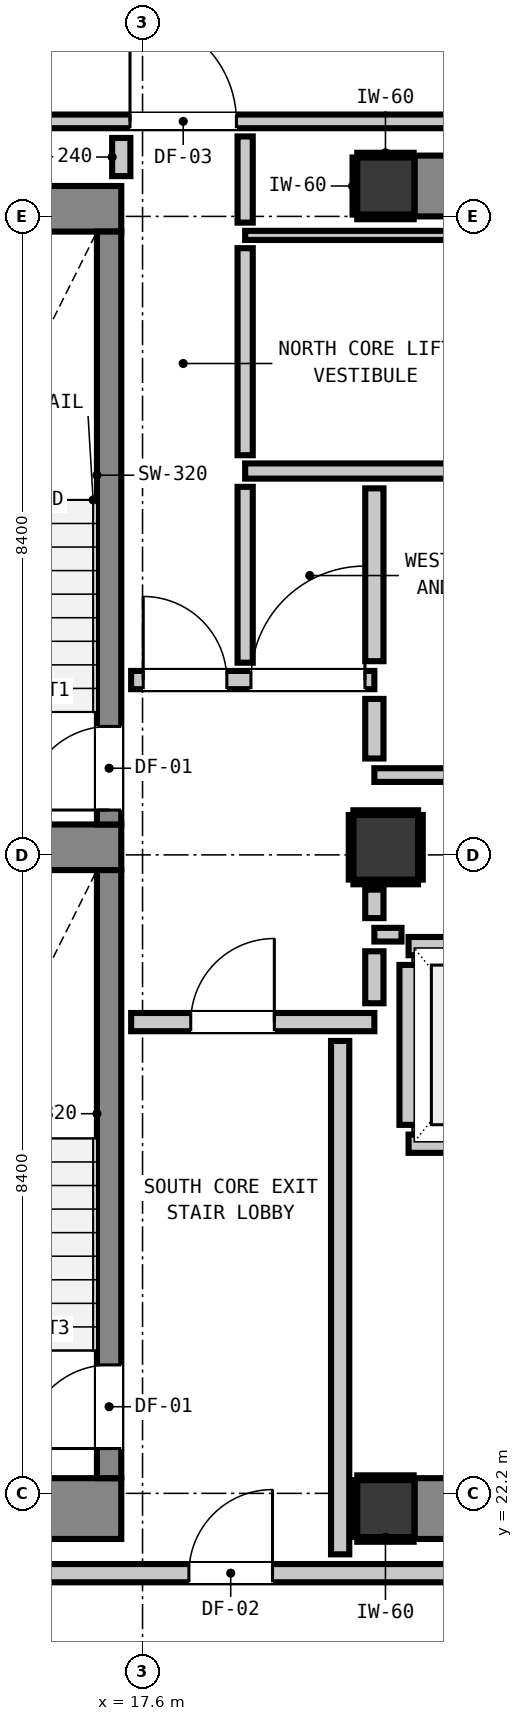
"""IFC4 building model, lengths in metres.
Left out: names, types, materials, properties, quantities, classifications, styles, units other than length and angle.
Written with IfcOpenShell. Run it as: python <this file> out.ifc"""

import sys

from ifc_helpers import new_model, si_unit, direction, frame, frame_2d, origin, origin_2d, place, context, subcontext, project, spatial, rectangle, extrude, element, fill, save


model = new_model("IFC4")
c1 = context("Model", 3, precision=1e-05, world=origin(), true_north=direction((0.0, 1.0)))
c2 = subcontext(c1, "Body", "Model", "MODEL_VIEW")
j1 = project(units=[si_unit("LENGTHUNIT", "METRE"), si_unit("PLANEANGLEUNIT", "RADIAN")], contexts=[c1])
p1 = place(None, origin())
s1 = spatial("IfcSite", under=j1, at=p1, CompositionType="ELEMENT")
p2 = place(p1, origin())
s2 = spatial("IfcBuilding", under=s1, at=p2, CompositionType="ELEMENT")
p3 = place(p2, frame((0.0, 0.0, 180.2)))
s3 = spatial("IfcBuildingStorey", under=s2, at=p3, CompositionType="ELEMENT", Elevation=180.2)
for number, where, z_axis, x_axis in (
    (1, (20.8, 22.0, 0.0), (0.0, 0.0, 1.0), (1.0, 0.0, 0.0)),
    (2, (20.8, 39.4, 0.0), (0.0, 0.0, 1.0), (1.0, 0.0, 0.0)),
):
    element("IfcColumn", number, at=place(p3, frame(where, z_axis=z_axis, x_axis=x_axis)), inside=s3, PredefinedType="COLUMN", context=c2, shape_type="SweptSolid", body=[
        extrude(rectangle(XDim=0.75, YDim=0.75, at=origin_2d()), origin(), (0.0, 0.0, 1.0), 3.32),
    ])
p4 = place(p3, frame((13.24, 22.0, 0.0), z_axis=(0.0, 0.0, 1.0), x_axis=(1.0, 0.0, 0.0)))
e3 = element("IfcWall", 3, at=p4, inside=s3, PredefinedType="SHEAR", context=c2, shape_type="SweptSolid", body=[
    extrude(rectangle(XDim=4.08, YDim=0.8, at=frame_2d((2.04, 0.0))), origin(), (0.0, 0.0, 1.0), 3.32),
])
p5 = place(p3, frame((13.24, 39.1, 0.0), z_axis=(0.0, 0.0, 1.0), x_axis=(1.0, 0.0, 0.0)))
e4 = element("IfcWall", 4, at=p5, inside=s3, PredefinedType="SHEAR", context=c2, shape_type="SweptSolid", body=[
    extrude(rectangle(XDim=4.08, YDim=0.6, at=frame_2d((2.04, 0.0))), origin(), (0.0, 0.0, 1.0), 3.32),
])
p6 = place(p3, frame((13.78, 30.7, 0.0), z_axis=(0.0, 0.0, 1.0), x_axis=(1.0, 0.0, 0.0)))
e5 = element("IfcWall", 5, at=p6, inside=s3, PredefinedType="SHEAR", context=c2, shape_type="SweptSolid", body=[
    extrude(rectangle(XDim=3.54, YDim=0.6, at=frame_2d((1.77, 0.0))), origin(), (0.0, 0.0, 1.0), 3.32),
])
for number, where, z_axis, x_axis in (
    (6, (21.18, 22.0, 0.0), (0.0, 0.0, 1.0), (1.0, 0.0, 0.0)),
    (7, (21.18, 39.4, 0.0), (0.0, 0.0, 1.0), (1.0, 0.0, 0.0)),
):
    element("IfcWall", number, at=place(p3, frame(where, z_axis=z_axis, x_axis=x_axis)), inside=s3, PredefinedType="SHEAR", context=c2, shape_type="SweptSolid", body=[
        extrude(rectangle(XDim=7.64, YDim=0.8, at=frame_2d((3.82, 0.0))), origin(), (0.0, 0.0, 1.0), 3.32),
    ])
p7 = place(p3, frame((17.16, 31.0, 0.0), z_axis=(0.0, 0.0, 1.0), x_axis=(0.0, 1.0, 0.0)))
e8 = element("IfcWall", 8, at=p7, inside=s3, PredefinedType="SHEAR", context=c2, shape_type="SweptSolid", body=[
    extrude(rectangle(XDim=7.8, YDim=0.32, at=frame_2d((3.9, 0.0))), origin(), (0.0, 0.0, 1.0), 3.32),
])
p8 = place(p7, frame((0.19, 0.0, 0.0)))
e9 = element("IfcOpeningElement", 9, at=p8, cuts=e8, PredefinedType="OPENING", context=c2, shape_type="SweptSolid", body=[
    extrude(rectangle(XDim=1.1, YDim=2.15, at=frame_2d((0.55, 1.075))), frame((0.0, 0.17, 0.0), z_axis=(0.0, -1.0, 0.0), x_axis=(1.0, 0.0, 0.0)), (0.0, 0.0, 1.0), 0.34),
])
p9 = place(p3, frame((17.16, 22.4, 0.0), z_axis=(0.0, 0.0, 1.0), x_axis=(0.0, 1.0, 0.0)))
e10 = element("IfcWall", 10, at=p9, inside=s3, PredefinedType="SHEAR", context=c2, shape_type="SweptSolid", body=[
    extrude(rectangle(XDim=8.0, YDim=0.32, at=frame_2d((4.0, 0.0))), origin(), (0.0, 0.0, 1.0), 3.32),
])
p10 = place(p9, frame((0.39, 0.0, 0.0)))
e11 = element("IfcOpeningElement", 11, at=p10, cuts=e10, PredefinedType="OPENING", context=c2, shape_type="SweptSolid", body=[
    extrude(rectangle(XDim=1.1, YDim=2.15, at=frame_2d((0.55, 1.075))), frame((0.0, 0.17, 0.0), z_axis=(0.0, -1.0, 0.0), x_axis=(1.0, 0.0, 0.0)), (0.0, 0.0, 1.0), 0.34),
])
p11 = place(p3, frame((20.8, 30.7, 0.0), z_axis=(0.0, 0.0, 1.0), x_axis=(1.0, 0.0, 0.0)))
e12 = element("IfcColumn", 12, at=p11, inside=s3, PredefinedType="COLUMN", context=c2, shape_type="SweptSolid", body=[
    extrude(rectangle(XDim=0.85, YDim=0.85, at=origin_2d()), origin(), (0.0, 0.0, 1.0), 3.32),
])
for number, where, z_axis, x_axis in (
    (13, (21.1, 26.8, 0.0), (0.0, 0.0, 1.0), (1.0, 0.0, 0.0)),
    (14, (21.1, 29.4, 0.0), (0.0, 0.0, 1.0), (1.0, 0.0, 0.0)),
):
    element("IfcWall", number, at=place(p3, frame(where, z_axis=z_axis, x_axis=x_axis)), inside=s3, PredefinedType="PARTITIONING", context=c2, shape_type="SweptSolid", body=[
        extrude(rectangle(XDim=2.2, YDim=0.24, at=frame_2d((1.1, 0.0))), origin(), (0.0, 0.0, 1.0), 3.08),
    ])
p12 = place(p3, frame((21.1, 27.048, 0.0), z_axis=(0.0, 0.0, 1.0), x_axis=(0.0, 1.0, 0.0)))
e15 = element("IfcWall", 15, at=p12, inside=s3, PredefinedType="PARTITIONING", context=c2, shape_type="SweptSolid", body=[
    extrude(rectangle(XDim=2.104, YDim=0.24, at=frame_2d((1.052, 0.0))), origin(), (0.0, 0.0, 1.0), 2.315),
])
p13 = place(p3, frame((12.983, 21.15, 0.0), z_axis=(0.0, 0.0, 1.0), x_axis=(1.0, 0.0, 0.0)))
e16 = element("IfcWall", 16, at=p13, inside=s3, PredefinedType="PARTITIONING", context=c2, shape_type="SweptSolid", body=[
    extrude(rectangle(XDim=29.61, YDim=0.24, at=frame_2d((14.805, 0.0))), origin(), (0.0, 0.0, 1.0), 3.08),
])
p14 = place(p13, frame((5.227, 0.0, 0.0)))
e17 = element("IfcOpeningElement", 17, at=p14, cuts=e16, PredefinedType="OPENING", context=c2, shape_type="SweptSolid", body=[
    extrude(rectangle(XDim=1.1, YDim=2.15, at=frame_2d((0.55, 1.075))), frame((0.0, 0.13, 0.0), z_axis=(0.0, -1.0, 0.0), x_axis=(1.0, 0.0, 0.0)), (0.0, 0.0, 1.0), 0.26),
])
p15 = place(p13, frame((26.718, 0.0, 0.0)))
e18 = element("IfcOpeningElement", 18, at=p15, cuts=e16, PredefinedType="OPENING", context=c2, shape_type="SweptSolid", body=[
    extrude(rectangle(XDim=0.9, YDim=2.1, at=frame_2d((0.45, 1.05))), frame((0.0, 0.13, 0.0), z_axis=(0.0, -1.0, 0.0), x_axis=(1.0, 0.0, 0.0)), (0.0, 0.0, 1.0), 0.26),
])
p16 = place(p3, frame((17.45, 28.4, 0.0), z_axis=(0.0, 0.0, 1.0), x_axis=(1.0, 0.0, 0.0)))
e19 = element("IfcWall", 19, at=p16, inside=s3, PredefinedType="PARTITIONING", context=c2, shape_type="SweptSolid", body=[
    extrude(rectangle(XDim=3.2, YDim=0.24, at=frame_2d((1.6, 0.0))), origin(), (0.0, 0.0, 1.0), 3.08),
])
p17 = place(p16, frame((0.784, 0.0, 0.0)))
e20 = element("IfcOpeningElement", 20, at=p17, cuts=e19, PredefinedType="OPENING", context=c2, shape_type="SweptSolid", body=[
    extrude(rectangle(XDim=1.1, YDim=2.15, at=frame_2d((0.55, 1.075))), frame((0.0, 0.13, 0.0), z_axis=(0.0, -1.0, 0.0), x_axis=(1.0, 0.0, 0.0)), (0.0, 0.0, 1.0), 0.26),
])
p18 = place(p3, frame((17.45, 32.9, 0.0), z_axis=(0.0, 0.0, 1.0), x_axis=(1.0, 0.0, 0.0)))
e21 = element("IfcWall", 21, at=p18, inside=s3, PredefinedType="PARTITIONING", context=c2, shape_type="SweptSolid", body=[
    extrude(rectangle(XDim=3.2, YDim=0.24, at=frame_2d((1.6, 0.0))), origin(), (0.0, 0.0, 1.0), 3.08),
])
p19 = place(p18, frame((0.159, 0.0, 0.0)))
e22 = element("IfcOpeningElement", 22, at=p19, cuts=e21, PredefinedType="OPENING", context=c2, shape_type="SweptSolid", body=[
    extrude(rectangle(XDim=1.1, YDim=2.15, at=frame_2d((0.55, 1.075))), frame((0.0, 0.13, 0.0), z_axis=(0.0, -1.0, 0.0), x_axis=(1.0, 0.0, 0.0)), (0.0, 0.0, 1.0), 0.26),
])
p20 = place(p18, frame((1.576, 0.0, 0.0)))
e23 = element("IfcOpeningElement", 23, at=p20, cuts=e21, PredefinedType="OPENING", context=c2, shape_type="SweptSolid", body=[
    extrude(rectangle(XDim=1.5, YDim=2.15, at=frame_2d((0.75, 1.075))), frame((0.0, 0.13, 0.0), z_axis=(0.0, -1.0, 0.0), x_axis=(1.0, 0.0, 0.0)), (0.0, 0.0, 1.0), 0.26),
])
p21 = place(p3, frame((18.95, 35.65, 0.0), z_axis=(0.0, 0.0, 1.0), x_axis=(1.0, 0.0, 0.0)))
e24 = element("IfcWall", 24, at=p21, inside=s3, PredefinedType="PARTITIONING", context=c2, shape_type="SweptSolid", body=[
    extrude(rectangle(XDim=11.025, YDim=0.2, at=frame_2d((5.513, 0.0))), origin(), (0.0, 0.0, 1.0), 3.08),
])
p22 = place(p21, frame((9.749, 0.0, 0.0)))
e25 = element("IfcOpeningElement", 25, at=p22, cuts=e24, PredefinedType="OPENING", context=c2, shape_type="SweptSolid", body=[
    extrude(rectangle(XDim=0.9, YDim=2.1, at=frame_2d((0.45, 1.05))), frame((0.0, 0.11, 0.0), z_axis=(0.0, -1.0, 0.0), x_axis=(1.0, 0.0, 0.0)), (0.0, 0.0, 1.0), 0.22),
])
p23 = place(p3, frame((20.65, 29.55, 0.0), z_axis=(0.0, 0.0, 1.0), x_axis=(1.0, 0.0, 0.0)))
e26 = element("IfcWall", 26, at=p23, inside=s3, PredefinedType="PARTITIONING", context=c2, shape_type="SweptSolid", body=[
    extrude(rectangle(XDim=0.357, YDim=0.18, at=frame_2d((0.179, 0.0))), origin(), (0.0, 0.0, 1.0), 3.08),
])
p24 = place(p3, frame((20.65, 31.65, 0.0), z_axis=(0.0, 0.0, 1.0), x_axis=(1.0, 0.0, 0.0)))
e27 = element("IfcWall", 27, at=p24, inside=s3, PredefinedType="PARTITIONING", context=c2, shape_type="SweptSolid", body=[
    extrude(rectangle(XDim=7.7, YDim=0.18, at=frame_2d((3.85, 0.0))), origin(), (0.0, 0.0, 1.0), 3.08),
])
p25 = place(p24, frame((4.673, 0.0, 0.0)))
e28 = element("IfcOpeningElement", 28, at=p25, cuts=e27, PredefinedType="OPENING", context=c2, shape_type="SweptSolid", body=[
    extrude(rectangle(XDim=0.9, YDim=2.1, at=frame_2d((0.45, 1.05))), frame((0.0, 0.1, 0.0), z_axis=(0.0, -1.0, 0.0), x_axis=(1.0, 0.0, 0.0)), (0.0, 0.0, 1.0), 0.2),
])
p26 = place(p3, frame((3.207, 40.25, 0.0), z_axis=(0.0, 0.0, 1.0), x_axis=(1.0, 0.0, 0.0)))
e29 = element("IfcWall", 29, at=p26, inside=s3, PredefinedType="PARTITIONING", context=c2, shape_type="SweptSolid", body=[
    extrude(rectangle(XDim=39.386, YDim=0.18, at=frame_2d((19.693, 0.0))), origin(), (0.0, 0.0, 1.0), 3.08),
])
p27 = place(p26, frame((14.228, 0.0, 0.0)))
e30 = element("IfcOpeningElement", 30, at=p27, cuts=e29, PredefinedType="OPENING", context=c2, shape_type="SweptSolid", body=[
    extrude(rectangle(XDim=1.4, YDim=2.15, at=frame_2d((0.7, 1.075))), frame((0.0, 0.1, 0.0), z_axis=(0.0, -1.0, 0.0), x_axis=(1.0, 0.0, 0.0)), (0.0, 0.0, 1.0), 0.2),
])
p28 = place(p26, frame((4.042, 0.0, 0.0)))
e31 = element("IfcOpeningElement", 31, at=p28, cuts=e29, PredefinedType="OPENING", context=c2, shape_type="SweptSolid", body=[
    extrude(rectangle(XDim=0.9, YDim=2.1, at=frame_2d((0.45, 1.05))), frame((0.0, 0.1, 0.0), z_axis=(0.0, -1.0, 0.0), x_axis=(1.0, 0.0, 0.0)), (0.0, 0.0, 1.0), 0.2),
])
p29 = place(p26, frame((36.444, 0.0, 0.0)))
e32 = element("IfcOpeningElement", 32, at=p29, cuts=e29, PredefinedType="OPENING", context=c2, shape_type="SweptSolid", body=[
    extrude(rectangle(XDim=1.0, YDim=2.15, at=frame_2d((0.5, 1.075))), frame((0.0, 0.1, 0.0), z_axis=(0.0, -1.0, 0.0), x_axis=(1.0, 0.0, 0.0)), (0.0, 0.0, 1.0), 0.2),
])
p30 = place(p3, frame((18.95, 38.75, 0.0), z_axis=(0.0, 0.0, 1.0), x_axis=(1.0, 0.0, 0.0)))
e33 = element("IfcWall", 33, at=p30, inside=s3, PredefinedType="PARTITIONING", context=c2, shape_type="SweptSolid", body=[
    extrude(rectangle(XDim=13.56, YDim=0.12, at=frame_2d((6.78, 0.0))), origin(), (0.0, 0.0, 1.0), 3.08),
])
p31 = place(p3, frame((17.32, 39.53, 0.0), z_axis=(0.0, 0.0, 1.0), x_axis=(0.0, 1.0, 0.0)))
e34 = element("IfcWall", 34, at=p31, inside=s3, PredefinedType="PARTITIONING", context=c2, shape_type="SweptSolid", body=[
    extrude(rectangle(XDim=0.502, YDim=0.24, at=frame_2d((0.251, 0.0))), origin(), (0.0, 0.0, 1.0), 3.08),
])
p32 = place(p3, frame((20.2, 21.398, 0.0), z_axis=(0.0, 0.0, 1.0), x_axis=(0.0, 1.0, 0.0)))
e35 = element("IfcWall", 35, at=p32, inside=s3, PredefinedType="PARTITIONING", context=c2, shape_type="SweptSolid", body=[
    extrude(rectangle(XDim=6.754, YDim=0.24, at=frame_2d((3.377, 0.0))), origin(), (0.0, 0.0, 1.0), 3.08),
])
p33 = place(p3, frame((20.65, 28.648, 0.0), z_axis=(0.0, 0.0, 1.0), x_axis=(0.0, 1.0, 0.0)))
e36 = element("IfcWall", 36, at=p33, inside=s3, PredefinedType="PARTITIONING", context=c2, shape_type="SweptSolid", body=[
    extrude(rectangle(XDim=0.684, YDim=0.24, at=frame_2d((0.342, 0.0))), origin(), (0.0, 0.0, 1.0), 2.315),
])
p34 = place(p3, frame((20.65, 29.768, 0.0), z_axis=(0.0, 0.0, 1.0), x_axis=(0.0, 1.0, 0.0)))
e37 = element("IfcWall", 37, at=p34, inside=s3, PredefinedType="PARTITIONING", context=c2, shape_type="SweptSolid", body=[
    extrude(rectangle(XDim=0.375, YDim=0.24, at=frame_2d((0.188, 0.0))), origin(), (0.0, 0.0, 1.0), 2.315),
])
p35 = place(p3, frame((20.65, 31.868, 0.0), z_axis=(0.0, 0.0, 1.0), x_axis=(0.0, 1.0, 0.0)))
e38 = element("IfcWall", 38, at=p35, inside=s3, PredefinedType="PARTITIONING", context=c2, shape_type="SweptSolid", body=[
    extrude(rectangle(XDim=0.784, YDim=0.24, at=frame_2d((0.392, 0.0))), origin(), (0.0, 0.0, 1.0), 2.315),
])
p36 = place(p3, frame((20.65, 33.148, 0.0), z_axis=(0.0, 0.0, 1.0), x_axis=(0.0, 1.0, 0.0)))
e39 = element("IfcWall", 39, at=p36, inside=s3, PredefinedType="PARTITIONING", context=c2, shape_type="SweptSolid", body=[
    extrude(rectangle(XDim=2.274, YDim=0.24, at=frame_2d((1.137, 0.0))), origin(), (0.0, 0.0, 1.0), 2.315),
])
p37 = place(p3, frame((18.95, 33.128, 0.0), z_axis=(0.0, 0.0, 1.0), x_axis=(0.0, 1.0, 0.0)))
e40 = element("IfcWall", 40, at=p37, inside=s3, PredefinedType="PARTITIONING", context=c2, shape_type="SweptSolid", body=[
    extrude(rectangle(XDim=2.314, YDim=0.2, at=frame_2d((1.157, 0.0))), origin(), (0.0, 0.0, 1.0), 3.08),
])
p38 = place(p3, frame((18.95, 35.858, 0.0), z_axis=(0.0, 0.0, 1.0), x_axis=(0.0, 1.0, 0.0)))
e41 = element("IfcWall", 41, at=p38, inside=s3, PredefinedType="PARTITIONING", context=c2, shape_type="SweptSolid", body=[
    extrude(rectangle(XDim=2.724, YDim=0.2, at=frame_2d((1.362, 0.0))), origin(), (0.0, 0.0, 1.0), 3.08),
])
p39 = place(p3, frame((18.95, 38.918, 0.0), z_axis=(0.0, 0.0, 1.0), x_axis=(0.0, 1.0, 0.0)))
e42 = element("IfcWall", 42, at=p39, inside=s3, PredefinedType="PARTITIONING", context=c2, shape_type="SweptSolid", body=[
    extrude(rectangle(XDim=1.134, YDim=0.2, at=frame_2d((0.567, 0.0))), origin(), (0.0, 0.0, 1.0), 3.08),
])
for number, where, z_axis, x_axis in (
    (43, (20.425, 21.593, 0.0), (0.0, 0.0, 1.0), (1.0, 0.0, 0.0)),
    (44, (20.425, 22.407, 0.0), (0.0, 0.0, 1.0), (1.0, 0.0, 0.0)),
):
    element("IfcWall", number, at=place(p3, frame(where, z_axis=z_axis, x_axis=x_axis)), inside=s3, PredefinedType="PARTITIONING", context=c2, shape_type="SweptSolid", body=[
        extrude(rectangle(XDim=0.742, YDim=0.06, at=frame_2d((0.371, 0.0))), origin(), (0.0, 0.0, 1.0), 1.45),
    ])
p40 = place(p3, frame((20.393, 21.625, 0.0), z_axis=(0.0, 0.0, 1.0), x_axis=(0.0, 1.0, 0.0)))
e45 = element("IfcWall", 45, at=p40, inside=s3, PredefinedType="PARTITIONING", context=c2, shape_type="SweptSolid", body=[
    extrude(rectangle(XDim=0.75, YDim=0.06, at=frame_2d((0.375, 0.0))), origin(), (0.0, 0.0, 1.0), 1.45),
])
for number, where, z_axis, x_axis in (
    (46, (20.425, 38.993, 0.0), (0.0, 0.0, 1.0), (1.0, 0.0, 0.0)),
    (47, (20.425, 39.807, 0.0), (0.0, 0.0, 1.0), (1.0, 0.0, 0.0)),
):
    element("IfcWall", number, at=place(p3, frame(where, z_axis=z_axis, x_axis=x_axis)), inside=s3, PredefinedType="PARTITIONING", context=c2, shape_type="SweptSolid", body=[
        extrude(rectangle(XDim=0.742, YDim=0.06, at=frame_2d((0.371, 0.0))), origin(), (0.0, 0.0, 1.0), 1.45),
    ])
p41 = place(p3, frame((20.393, 39.025, 0.0), z_axis=(0.0, 0.0, 1.0), x_axis=(0.0, 1.0, 0.0)))
e48 = element("IfcWall", 48, at=p41, inside=s3, PredefinedType="PARTITIONING", context=c2, shape_type="SweptSolid", body=[
    extrude(rectangle(XDim=0.75, YDim=0.06, at=frame_2d((0.375, 0.0))), origin(), (0.0, 0.0, 1.0), 1.45),
])
for number, where, z_axis, x_axis in (
    (49, (20.375, 30.243, 0.0), (0.0, 0.0, 1.0), (1.0, 0.0, 0.0)),
    (50, (20.375, 31.157, 0.0), (0.0, 0.0, 1.0), (1.0, 0.0, 0.0)),
    (51, (20.343, 30.275, 0.0), (0.0, 0.0, 1.0), (0.0, 1.0, 0.0)),
    (52, (21.257, 30.275, 0.0), (0.0, 0.0, 1.0), (0.0, 1.0, 0.0)),
):
    element("IfcWall", number, at=place(p3, frame(where, z_axis=z_axis, x_axis=x_axis)), inside=s3, PredefinedType="PARTITIONING", context=c2, shape_type="SweptSolid", body=[
        extrude(rectangle(XDim=0.85, YDim=0.06, at=frame_2d((0.425, 0.0))), origin(), (0.0, 0.0, 1.0), 1.45),
    ])
p42 = place(p8, origin())
e53 = element("IfcDoor", 53, at=p42, inside=s3, OperationType="SINGLE_SWING_LEFT", PredefinedType="DOOR", context=c2, shape_type="SweptSolid", body=[
    extrude(rectangle(XDim=1.1, YDim=2.15, at=frame_2d((0.55, 1.075))), frame((0.0, 0.025, 0.0), z_axis=(0.0, -1.0, 0.0), x_axis=(1.0, 0.0, 0.0)), (0.0, 0.0, 1.0), 0.05),
])
fill(e9, e53)
p43 = place(p10, origin())
e54 = element("IfcDoor", 54, at=p43, inside=s3, OperationType="SINGLE_SWING_LEFT", PredefinedType="DOOR", context=c2, shape_type="SweptSolid", body=[
    extrude(rectangle(XDim=1.1, YDim=2.15, at=frame_2d((0.55, 1.075))), frame((0.0, 0.025, 0.0), z_axis=(0.0, -1.0, 0.0), x_axis=(1.0, 0.0, 0.0)), (0.0, 0.0, 1.0), 0.05),
])
fill(e11, e54)
p44 = place(p17, origin())
e55 = element("IfcDoor", 55, at=p44, inside=s3, OperationType="SINGLE_SWING_RIGHT", PredefinedType="DOOR", context=c2, shape_type="SweptSolid", body=[
    extrude(rectangle(XDim=1.1, YDim=2.15, at=frame_2d((0.55, 1.075))), frame((0.0, 0.025, 0.0), z_axis=(0.0, -1.0, 0.0), x_axis=(1.0, 0.0, 0.0)), (0.0, 0.0, 1.0), 0.05),
])
fill(e20, e55)
p45 = place(p19, origin())
e56 = element("IfcDoor", 56, at=p45, inside=s3, OperationType="SINGLE_SWING_LEFT", PredefinedType="DOOR", context=c2, shape_type="SweptSolid", body=[
    extrude(rectangle(XDim=1.1, YDim=2.15, at=frame_2d((0.55, 1.075))), frame((0.0, 0.025, 0.0), z_axis=(0.0, -1.0, 0.0), x_axis=(1.0, 0.0, 0.0)), (0.0, 0.0, 1.0), 0.05),
])
fill(e22, e56)
p46 = place(p14, origin())
e57 = element("IfcDoor", 57, at=p46, inside=s3, OperationType="SINGLE_SWING_RIGHT", PredefinedType="DOOR", context=c2, shape_type="SweptSolid", body=[
    extrude(rectangle(XDim=1.1, YDim=2.15, at=frame_2d((0.55, 1.075))), frame((0.0, 0.025, 0.0), z_axis=(0.0, -1.0, 0.0), x_axis=(1.0, 0.0, 0.0)), (0.0, 0.0, 1.0), 0.05),
])
fill(e17, e57)
p47 = place(p27, origin())
e58 = element("IfcDoor", 58, at=p47, inside=s3, OperationType="SINGLE_SWING_LEFT", PredefinedType="DOOR", context=c2, shape_type="SweptSolid", body=[
    extrude(rectangle(XDim=1.4, YDim=2.15, at=frame_2d((0.7, 1.075))), frame((0.0, 0.025, 0.0), z_axis=(0.0, -1.0, 0.0), x_axis=(1.0, 0.0, 0.0)), (0.0, 0.0, 1.0), 0.05),
])
fill(e30, e58)
p48 = place(p20, origin())
e59 = element("IfcDoor", 59, at=p48, inside=s3, OperationType="SINGLE_SWING_RIGHT", PredefinedType="DOOR", context=c2, shape_type="SweptSolid", body=[
    extrude(rectangle(XDim=1.5, YDim=2.15, at=frame_2d((0.75, 1.075))), frame((0.0, 0.025, 0.0), z_axis=(0.0, -1.0, 0.0), x_axis=(1.0, 0.0, 0.0)), (0.0, 0.0, 1.0), 0.05),
])
fill(e23, e59)
save(model, sys.argv[1])
